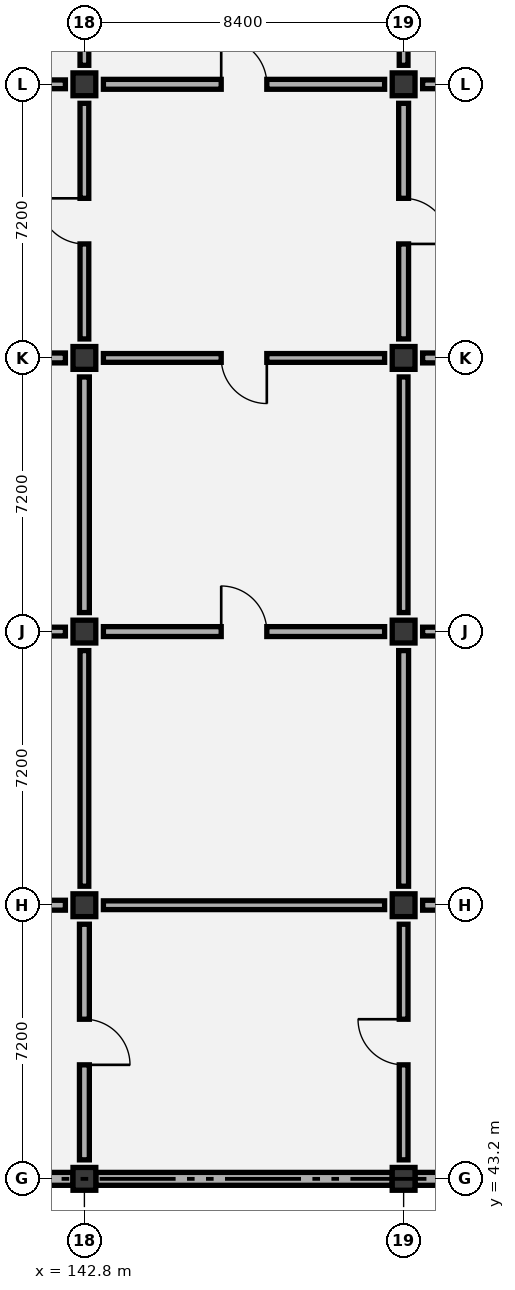
"""IFC4 building model, lengths in metres.
Left out: names, types, materials, properties, quantities, classifications, styles, units other than length and angle.
Written with IfcOpenShell. Run it as: python <this file> out.ifc"""

import sys

from ifc_helpers import new_model, si_unit, direction, frame, frame_2d, origin, origin_2d, place, context, subcontext, project, spatial, rectangle, extrude, element, fill, save


model = new_model("IFC4")
c1 = context("Model", 3, precision=1e-05, world=origin(), true_north=direction((0.0, 1.0)))
c2 = subcontext(c1, "Body", "Model", "MODEL_VIEW")
j1 = project(units=[si_unit("LENGTHUNIT", "METRE"), si_unit("PLANEANGLEUNIT", "RADIAN")], contexts=[c1])
p1 = place(None, origin())
s1 = spatial("IfcSite", under=j1, at=p1, CompositionType="ELEMENT")
p2 = place(p1, origin())
s2 = spatial("IfcBuilding", under=s1, at=p2, CompositionType="ELEMENT")
p3 = place(p2, frame((0.0, 0.0, 11.4)))
s3 = spatial("IfcBuildingStorey", under=s2, at=p3, CompositionType="ELEMENT", Elevation=11.4)
for number, where, z_axis, x_axis in (
    (1, (142.8, 43.2, 0.0), (0.0, 0.0, 1.0), (1.0, 0.0, 0.0)),
    (2, (142.8, 50.4, 0.0), (0.0, 0.0, 1.0), (1.0, 0.0, 0.0)),
    (3, (142.8, 57.6, 0.0), (0.0, 0.0, 1.0), (1.0, 0.0, 0.0)),
    (4, (142.8, 64.8, 0.0), (0.0, 0.0, 1.0), (1.0, 0.0, 0.0)),
    (5, (142.8, 72.0, 0.0), (0.0, 0.0, 1.0), (1.0, 0.0, 0.0)),
    (6, (151.2, 43.2, 0.0), (0.0, 0.0, 1.0), (1.0, 0.0, 0.0)),
    (7, (151.2, 50.4, 0.0), (0.0, 0.0, 1.0), (1.0, 0.0, 0.0)),
    (8, (151.2, 57.6, 0.0), (0.0, 0.0, 1.0), (1.0, 0.0, 0.0)),
    (9, (151.2, 64.8, 0.0), (0.0, 0.0, 1.0), (1.0, 0.0, 0.0)),
    (10, (151.2, 72.0, 0.0), (0.0, 0.0, 1.0), (1.0, 0.0, 0.0)),
):
    element("IfcColumn", number, at=place(p3, frame(where, z_axis=z_axis, x_axis=x_axis)), inside=s3, PredefinedType="COLUMN", context=c2, shape_type="SweptSolid", body=[
        extrude(rectangle(XDim=0.6, YDim=0.6, at=origin_2d()), origin(), (0.0, 0.0, 1.0), 5.4),
    ])
p4 = place(p3, frame((134.7, 43.2, 0.0), z_axis=(0.0, 0.0, 1.0), x_axis=(1.0, 0.0, 0.0)))
e11 = element("IfcWall", 11, at=p4, inside=s3, PredefinedType="SOLIDWALL", context=c2, shape_type="SweptSolid", body=[
    extrude(rectangle(XDim=7.8, YDim=0.34, at=frame_2d((3.9, 0.0))), origin(), (0.0, 0.0, 1.0), 4.445),
])
p5 = place(p3, frame((143.1, 43.2, 0.0), z_axis=(0.0, 0.0, 1.0), x_axis=(1.0, 0.0, 0.0)))
e12 = element("IfcWall", 12, at=p5, inside=s3, PredefinedType="SOLIDWALL", context=c2, shape_type="SweptSolid", body=[
    extrude(rectangle(XDim=7.8, YDim=0.34, at=frame_2d((3.9, 0.0))), origin(), (0.0, 0.0, 1.0), 4.445),
])
p6 = place(p3, frame((151.5, 43.2, 0.0), z_axis=(0.0, 0.0, 1.0), x_axis=(1.0, 0.0, 0.0)))
e13 = element("IfcWall", 13, at=p6, inside=s3, PredefinedType="SOLIDWALL", context=c2, shape_type="SweptSolid", body=[
    extrude(rectangle(XDim=7.8, YDim=0.34, at=frame_2d((3.9, 0.0))), origin(), (0.0, 0.0, 1.0), 4.52),
])
p7 = place(p3, frame((142.8, 43.7, 0.0), z_axis=(0.0, 0.0, 1.0), x_axis=(0.0, 1.0, 0.0)))
e14 = element("IfcWall", 14, at=p7, inside=s3, PredefinedType="PARTITIONING", context=c2, shape_type="SweptSolid", body=[
    extrude(rectangle(XDim=6.2, YDim=0.26, at=frame_2d((3.1, 0.0))), origin(), (0.0, 0.0, 1.0), 4.395),
])
p8 = place(p7, frame((2.5, 0.0, 0.0)))
e15 = element("IfcOpeningElement", 15, at=p8, cuts=e14, PredefinedType="OPENING", context=c2, shape_type="SweptSolid", body=[
    extrude(rectangle(XDim=1.2, YDim=2.1, at=frame_2d((0.6, 1.05))), frame((0.0, 0.14, 0.0), z_axis=(0.0, -1.0, 0.0), x_axis=(1.0, 0.0, 0.0)), (0.0, 0.0, 1.0), 0.28),
])
p9 = place(p3, frame((134.9, 50.4, 0.0), z_axis=(0.0, 0.0, 1.0), x_axis=(1.0, 0.0, 0.0)))
e16 = element("IfcWall", 16, at=p9, inside=s3, PredefinedType="PARTITIONING", context=c2, shape_type="SweptSolid", body=[
    extrude(rectangle(XDim=7.4, YDim=0.26, at=frame_2d((3.7, 0.0))), origin(), (0.0, 0.0, 1.0), 4.345),
])
p10 = place(p3, frame((142.8, 50.9, 0.0), z_axis=(0.0, 0.0, 1.0), x_axis=(0.0, 1.0, 0.0)))
e17 = element("IfcWall", 17, at=p10, inside=s3, PredefinedType="PARTITIONING", context=c2, shape_type="SweptSolid", body=[
    extrude(rectangle(XDim=6.2, YDim=0.23, at=frame_2d((3.1, 0.0))), origin(), (0.0, 0.0, 1.0), 4.805),
])
p11 = place(p3, frame((134.9, 57.6, 0.0), z_axis=(0.0, 0.0, 1.0), x_axis=(1.0, 0.0, 0.0)))
e18 = element("IfcWall", 18, at=p11, inside=s3, PredefinedType="PARTITIONING", context=c2, shape_type="SweptSolid", body=[
    extrude(rectangle(XDim=7.4, YDim=0.23, at=frame_2d((3.7, 0.0))), origin(), (0.0, 0.0, 1.0), 4.345),
])
p12 = place(p11, frame((3.1, 0.0, 0.0)))
e19 = element("IfcOpeningElement", 19, at=p12, cuts=e18, PredefinedType="OPENING", context=c2, shape_type="SweptSolid", body=[
    extrude(rectangle(XDim=1.2, YDim=2.1, at=frame_2d((0.6, 1.05))), frame((0.0, 0.125, 0.0), z_axis=(0.0, -1.0, 0.0), x_axis=(1.0, 0.0, 0.0)), (0.0, 0.0, 1.0), 0.25),
])
p13 = place(p3, frame((142.8, 58.1, 0.0), z_axis=(0.0, 0.0, 1.0), x_axis=(0.0, 1.0, 0.0)))
e20 = element("IfcWall", 20, at=p13, inside=s3, PredefinedType="PARTITIONING", context=c2, shape_type="SweptSolid", body=[
    extrude(rectangle(XDim=6.2, YDim=0.26, at=frame_2d((3.1, 0.0))), origin(), (0.0, 0.0, 1.0), 4.395),
])
p14 = place(p3, frame((134.9, 64.8, 0.0), z_axis=(0.0, 0.0, 1.0), x_axis=(1.0, 0.0, 0.0)))
e21 = element("IfcWall", 21, at=p14, inside=s3, PredefinedType="PARTITIONING", context=c2, shape_type="SweptSolid", body=[
    extrude(rectangle(XDim=7.4, YDim=0.26, at=frame_2d((3.7, 0.0))), origin(), (0.0, 0.0, 1.0), 4.345),
])
p15 = place(p14, frame((3.1, 0.0, 0.0)))
e22 = element("IfcOpeningElement", 22, at=p15, cuts=e21, PredefinedType="OPENING", context=c2, shape_type="SweptSolid", body=[
    extrude(rectangle(XDim=1.2, YDim=2.1, at=frame_2d((0.6, 1.05))), frame((0.0, 0.14, 0.0), z_axis=(0.0, -1.0, 0.0), x_axis=(1.0, 0.0, 0.0)), (0.0, 0.0, 1.0), 0.28),
])
p16 = place(p3, frame((142.8, 65.3, 0.0), z_axis=(0.0, 0.0, 1.0), x_axis=(0.0, 1.0, 0.0)))
e23 = element("IfcWall", 23, at=p16, inside=s3, PredefinedType="PARTITIONING", context=c2, shape_type="SweptSolid", body=[
    extrude(rectangle(XDim=6.2, YDim=0.23, at=frame_2d((3.1, 0.0))), origin(), (0.0, 0.0, 1.0), 4.595),
])
p17 = place(p16, frame((2.5, 0.0, 0.0)))
e24 = element("IfcOpeningElement", 24, at=p17, cuts=e23, PredefinedType="OPENING", context=c2, shape_type="SweptSolid", body=[
    extrude(rectangle(XDim=1.2, YDim=2.1, at=frame_2d((0.6, 1.05))), frame((0.0, 0.125, 0.0), z_axis=(0.0, -1.0, 0.0), x_axis=(1.0, 0.0, 0.0)), (0.0, 0.0, 1.0), 0.25),
])
p18 = place(p3, frame((134.9, 72.0, 0.0), z_axis=(0.0, 0.0, 1.0), x_axis=(1.0, 0.0, 0.0)))
e25 = element("IfcWall", 25, at=p18, inside=s3, PredefinedType="PARTITIONING", context=c2, shape_type="SweptSolid", body=[
    extrude(rectangle(XDim=7.4, YDim=0.23, at=frame_2d((3.7, 0.0))), origin(), (0.0, 0.0, 1.0), 4.345),
])
p19 = place(p18, frame((2.95, 0.0, 0.0)))
e26 = element("IfcOpeningElement", 26, at=p19, cuts=e25, PredefinedType="OPENING", context=c2, shape_type="SweptSolid", body=[
    extrude(rectangle(XDim=1.5, YDim=2.15, at=frame_2d((0.75, 1.075))), frame((0.0, 0.125, 0.0), z_axis=(0.0, -1.0, 0.0), x_axis=(1.0, 0.0, 0.0)), (0.0, 0.0, 1.0), 0.25),
])
p20 = place(p3, frame((142.8, 72.5, 0.0), z_axis=(0.0, 0.0, 1.0), x_axis=(0.0, 1.0, 0.0)))
e27 = element("IfcWall", 27, at=p20, inside=s3, PredefinedType="PARTITIONING", context=c2, shape_type="SweptSolid", body=[
    extrude(rectangle(XDim=6.2, YDim=0.23, at=frame_2d((3.1, 0.0))), origin(), (0.0, 0.0, 1.0), 4.395),
])
p21 = place(p3, frame((151.2, 43.7, 0.0), z_axis=(0.0, 0.0, 1.0), x_axis=(0.0, 1.0, 0.0)))
e28 = element("IfcWall", 28, at=p21, inside=s3, PredefinedType="PARTITIONING", context=c2, shape_type="SweptSolid", body=[
    extrude(rectangle(XDim=6.2, YDim=0.23, at=frame_2d((3.1, 0.0))), origin(), (0.0, 0.0, 1.0), 4.805),
])
p22 = place(p21, frame((2.5, 0.0, 0.0)))
e29 = element("IfcOpeningElement", 29, at=p22, cuts=e28, PredefinedType="OPENING", context=c2, shape_type="SweptSolid", body=[
    extrude(rectangle(XDim=1.2, YDim=2.1, at=frame_2d((0.6, 1.05))), frame((0.0, 0.125, 0.0), z_axis=(0.0, -1.0, 0.0), x_axis=(1.0, 0.0, 0.0)), (0.0, 0.0, 1.0), 0.25),
])
p23 = place(p3, frame((143.3, 50.4, 0.0), z_axis=(0.0, 0.0, 1.0), x_axis=(1.0, 0.0, 0.0)))
e30 = element("IfcWall", 30, at=p23, inside=s3, PredefinedType="PARTITIONING", context=c2, shape_type="SweptSolid", body=[
    extrude(rectangle(XDim=7.4, YDim=0.23, at=frame_2d((3.7, 0.0))), origin(), (0.0, 0.0, 1.0), 4.345),
])
p24 = place(p3, frame((151.2, 50.9, 0.0), z_axis=(0.0, 0.0, 1.0), x_axis=(0.0, 1.0, 0.0)))
e31 = element("IfcWall", 31, at=p24, inside=s3, PredefinedType="PARTITIONING", context=c2, shape_type="SweptSolid", body=[
    extrude(rectangle(XDim=6.2, YDim=0.26, at=frame_2d((3.1, 0.0))), origin(), (0.0, 0.0, 1.0), 4.395),
])
p25 = place(p3, frame((143.3, 57.6, 0.0), z_axis=(0.0, 0.0, 1.0), x_axis=(1.0, 0.0, 0.0)))
e32 = element("IfcWall", 32, at=p25, inside=s3, PredefinedType="PARTITIONING", context=c2, shape_type="SweptSolid", body=[
    extrude(rectangle(XDim=7.4, YDim=0.26, at=frame_2d((3.7, 0.0))), origin(), (0.0, 0.0, 1.0), 4.345),
])
p26 = place(p25, frame((3.1, 0.0, 0.0)))
e33 = element("IfcOpeningElement", 33, at=p26, cuts=e32, PredefinedType="OPENING", context=c2, shape_type="SweptSolid", body=[
    extrude(rectangle(XDim=1.2, YDim=2.1, at=frame_2d((0.6, 1.05))), frame((0.0, 0.14, 0.0), z_axis=(0.0, -1.0, 0.0), x_axis=(1.0, 0.0, 0.0)), (0.0, 0.0, 1.0), 0.28),
])
p27 = place(p3, frame((151.2, 58.1, 0.0), z_axis=(0.0, 0.0, 1.0), x_axis=(0.0, 1.0, 0.0)))
e34 = element("IfcWall", 34, at=p27, inside=s3, PredefinedType="PARTITIONING", context=c2, shape_type="SweptSolid", body=[
    extrude(rectangle(XDim=6.2, YDim=0.23, at=frame_2d((3.1, 0.0))), origin(), (0.0, 0.0, 1.0), 4.595),
])
p28 = place(p3, frame((143.3, 64.8, 0.0), z_axis=(0.0, 0.0, 1.0), x_axis=(1.0, 0.0, 0.0)))
e35 = element("IfcWall", 35, at=p28, inside=s3, PredefinedType="PARTITIONING", context=c2, shape_type="SweptSolid", body=[
    extrude(rectangle(XDim=7.4, YDim=0.23, at=frame_2d((3.7, 0.0))), origin(), (0.0, 0.0, 1.0), 4.345),
])
p29 = place(p28, frame((3.1, 0.0, 0.0)))
e36 = element("IfcOpeningElement", 36, at=p29, cuts=e35, PredefinedType="OPENING", context=c2, shape_type="SweptSolid", body=[
    extrude(rectangle(XDim=1.2, YDim=2.1, at=frame_2d((0.6, 1.05))), frame((0.0, 0.125, 0.0), z_axis=(0.0, -1.0, 0.0), x_axis=(1.0, 0.0, 0.0)), (0.0, 0.0, 1.0), 0.25),
])
p30 = place(p3, frame((151.2, 65.3, 0.0), z_axis=(0.0, 0.0, 1.0), x_axis=(0.0, 1.0, 0.0)))
e37 = element("IfcWall", 37, at=p30, inside=s3, PredefinedType="PARTITIONING", context=c2, shape_type="SweptSolid", body=[
    extrude(rectangle(XDim=6.2, YDim=0.26, at=frame_2d((3.1, 0.0))), origin(), (0.0, 0.0, 1.0), 4.395),
])
p31 = place(p30, frame((2.5, 0.0, 0.0)))
e38 = element("IfcOpeningElement", 38, at=p31, cuts=e37, PredefinedType="OPENING", context=c2, shape_type="SweptSolid", body=[
    extrude(rectangle(XDim=1.2, YDim=2.1, at=frame_2d((0.6, 1.05))), frame((0.0, 0.14, 0.0), z_axis=(0.0, -1.0, 0.0), x_axis=(1.0, 0.0, 0.0)), (0.0, 0.0, 1.0), 0.28),
])
p32 = place(p3, frame((143.3, 72.0, 0.0), z_axis=(0.0, 0.0, 1.0), x_axis=(1.0, 0.0, 0.0)))
e39 = element("IfcWall", 39, at=p32, inside=s3, PredefinedType="PARTITIONING", context=c2, shape_type="SweptSolid", body=[
    extrude(rectangle(XDim=7.4, YDim=0.26, at=frame_2d((3.7, 0.0))), origin(), (0.0, 0.0, 1.0), 4.345),
])
p33 = place(p32, frame((3.1, 0.0, 0.0)))
e40 = element("IfcOpeningElement", 40, at=p33, cuts=e39, PredefinedType="OPENING", context=c2, shape_type="SweptSolid", body=[
    extrude(rectangle(XDim=1.2, YDim=2.1, at=frame_2d((0.6, 1.05))), frame((0.0, 0.14, 0.0), z_axis=(0.0, -1.0, 0.0), x_axis=(1.0, 0.0, 0.0)), (0.0, 0.0, 1.0), 0.28),
])
p34 = place(p3, frame((151.2, 72.5, 0.0), z_axis=(0.0, 0.0, 1.0), x_axis=(0.0, 1.0, 0.0)))
e41 = element("IfcWall", 41, at=p34, inside=s3, PredefinedType="PARTITIONING", context=c2, shape_type="SweptSolid", body=[
    extrude(rectangle(XDim=6.2, YDim=0.23, at=frame_2d((3.1, 0.0))), origin(), (0.0, 0.0, 1.0), 4.695),
])
p35 = place(p3, frame((151.7, 50.4, 0.0), z_axis=(0.0, 0.0, 1.0), x_axis=(1.0, 0.0, 0.0)))
e42 = element("IfcWall", 42, at=p35, inside=s3, PredefinedType="PARTITIONING", context=c2, shape_type="SweptSolid", body=[
    extrude(rectangle(XDim=7.4, YDim=0.26, at=frame_2d((3.7, 0.0))), origin(), (0.0, 0.0, 1.0), 4.42),
])
p36 = place(p3, frame((151.7, 57.6, 0.0), z_axis=(0.0, 0.0, 1.0), x_axis=(1.0, 0.0, 0.0)))
e43 = element("IfcWall", 43, at=p36, inside=s3, PredefinedType="PARTITIONING", context=c2, shape_type="SweptSolid", body=[
    extrude(rectangle(XDim=7.4, YDim=0.23, at=frame_2d((3.7, 0.0))), origin(), (0.0, 0.0, 1.0), 4.42),
])
p37 = place(p36, frame((3.1, 0.0, 0.0)))
e44 = element("IfcOpeningElement", 44, at=p37, cuts=e43, PredefinedType="OPENING", context=c2, shape_type="SweptSolid", body=[
    extrude(rectangle(XDim=1.2, YDim=2.1, at=frame_2d((0.6, 1.05))), frame((0.0, 0.125, 0.0), z_axis=(0.0, -1.0, 0.0), x_axis=(1.0, 0.0, 0.0)), (0.0, 0.0, 1.0), 0.25),
])
p38 = place(p3, frame((151.7, 64.8, 0.0), z_axis=(0.0, 0.0, 1.0), x_axis=(1.0, 0.0, 0.0)))
e45 = element("IfcWall", 45, at=p38, inside=s3, PredefinedType="PARTITIONING", context=c2, shape_type="SweptSolid", body=[
    extrude(rectangle(XDim=7.4, YDim=0.26, at=frame_2d((3.7, 0.0))), origin(), (0.0, 0.0, 1.0), 4.42),
])
p39 = place(p38, frame((3.1, 0.0, 0.0)))
e46 = element("IfcOpeningElement", 46, at=p39, cuts=e45, PredefinedType="OPENING", context=c2, shape_type="SweptSolid", body=[
    extrude(rectangle(XDim=1.2, YDim=2.1, at=frame_2d((0.6, 1.05))), frame((0.0, 0.14, 0.0), z_axis=(0.0, -1.0, 0.0), x_axis=(1.0, 0.0, 0.0)), (0.0, 0.0, 1.0), 0.28),
])
p40 = place(p3, frame((151.7, 72.0, 0.0), z_axis=(0.0, 0.0, 1.0), x_axis=(1.0, 0.0, 0.0)))
e47 = element("IfcWall", 47, at=p40, inside=s3, PredefinedType="PARTITIONING", context=c2, shape_type="SweptSolid", body=[
    extrude(rectangle(XDim=7.4, YDim=0.23, at=frame_2d((3.7, 0.0))), origin(), (0.0, 0.0, 1.0), 4.42),
])
p41 = place(p40, frame((3.1, 0.0, 0.0)))
e48 = element("IfcOpeningElement", 48, at=p41, cuts=e47, PredefinedType="OPENING", context=c2, shape_type="SweptSolid", body=[
    extrude(rectangle(XDim=1.2, YDim=2.1, at=frame_2d((0.6, 1.05))), frame((0.0, 0.125, 0.0), z_axis=(0.0, -1.0, 0.0), x_axis=(1.0, 0.0, 0.0)), (0.0, 0.0, 1.0), 0.25),
])
p42 = place(p8, frame((1.2, 0.0, 0.0), z_axis=(0.0, 0.0, 1.0), x_axis=(-1.0, 0.0, 0.0)))
e49 = element("IfcDoor", 49, at=p42, inside=s3, OperationType="SINGLE_SWING_RIGHT", PredefinedType="DOOR", context=c2, shape_type="SweptSolid", body=[
    extrude(rectangle(XDim=1.2, YDim=2.1, at=frame_2d((0.6, 1.05))), frame((0.0, 0.025, 0.0), z_axis=(0.0, -1.0, 0.0), x_axis=(1.0, 0.0, 0.0)), (0.0, 0.0, 1.0), 0.05),
])
fill(e15, e49)
p43 = place(p17, origin())
e50 = element("IfcDoor", 50, at=p43, inside=s3, OperationType="SINGLE_SWING_RIGHT", PredefinedType="DOOR", context=c2, shape_type="SweptSolid", body=[
    extrude(rectangle(XDim=1.2, YDim=2.1, at=frame_2d((0.6, 1.05))), frame((0.0, 0.025, 0.0), z_axis=(0.0, -1.0, 0.0), x_axis=(1.0, 0.0, 0.0)), (0.0, 0.0, 1.0), 0.05),
])
fill(e24, e50)
p44 = place(p22, origin())
e51 = element("IfcDoor", 51, at=p44, inside=s3, OperationType="SINGLE_SWING_RIGHT", PredefinedType="DOOR", context=c2, shape_type="SweptSolid", body=[
    extrude(rectangle(XDim=1.2, YDim=2.1, at=frame_2d((0.6, 1.05))), frame((0.0, 0.025, 0.0), z_axis=(0.0, -1.0, 0.0), x_axis=(1.0, 0.0, 0.0)), (0.0, 0.0, 1.0), 0.05),
])
fill(e29, e51)
p45 = place(p26, origin())
e52 = element("IfcDoor", 52, at=p45, inside=s3, OperationType="SINGLE_SWING_LEFT", PredefinedType="DOOR", context=c2, shape_type="SweptSolid", body=[
    extrude(rectangle(XDim=1.2, YDim=2.1, at=frame_2d((0.6, 1.05))), frame((0.0, 0.025, 0.0), z_axis=(0.0, -1.0, 0.0), x_axis=(1.0, 0.0, 0.0)), (0.0, 0.0, 1.0), 0.05),
])
fill(e33, e52)
p46 = place(p29, frame((1.2, 0.0, 0.0), z_axis=(0.0, 0.0, 1.0), x_axis=(-1.0, 0.0, 0.0)))
e53 = element("IfcDoor", 53, at=p46, inside=s3, OperationType="SINGLE_SWING_LEFT", PredefinedType="DOOR", context=c2, shape_type="SweptSolid", body=[
    extrude(rectangle(XDim=1.2, YDim=2.1, at=frame_2d((0.6, 1.05))), frame((0.0, 0.025, 0.0), z_axis=(0.0, -1.0, 0.0), x_axis=(1.0, 0.0, 0.0)), (0.0, 0.0, 1.0), 0.05),
])
fill(e36, e53)
p47 = place(p31, frame((1.2, 0.0, 0.0), z_axis=(0.0, 0.0, 1.0), x_axis=(-1.0, 0.0, 0.0)))
e54 = element("IfcDoor", 54, at=p47, inside=s3, OperationType="SINGLE_SWING_RIGHT", PredefinedType="DOOR", context=c2, shape_type="SweptSolid", body=[
    extrude(rectangle(XDim=1.2, YDim=2.1, at=frame_2d((0.6, 1.05))), frame((0.0, 0.025, 0.0), z_axis=(0.0, -1.0, 0.0), x_axis=(1.0, 0.0, 0.0)), (0.0, 0.0, 1.0), 0.05),
])
fill(e38, e54)
p48 = place(p33, origin())
e55 = element("IfcDoor", 55, at=p48, inside=s3, OperationType="SINGLE_SWING_LEFT", PredefinedType="DOOR", context=c2, shape_type="SweptSolid", body=[
    extrude(rectangle(XDim=1.2, YDim=2.1, at=frame_2d((0.6, 1.05))), frame((0.0, 0.025, 0.0), z_axis=(0.0, -1.0, 0.0), x_axis=(1.0, 0.0, 0.0)), (0.0, 0.0, 1.0), 0.05),
])
fill(e40, e55)
save(model, sys.argv[1])
